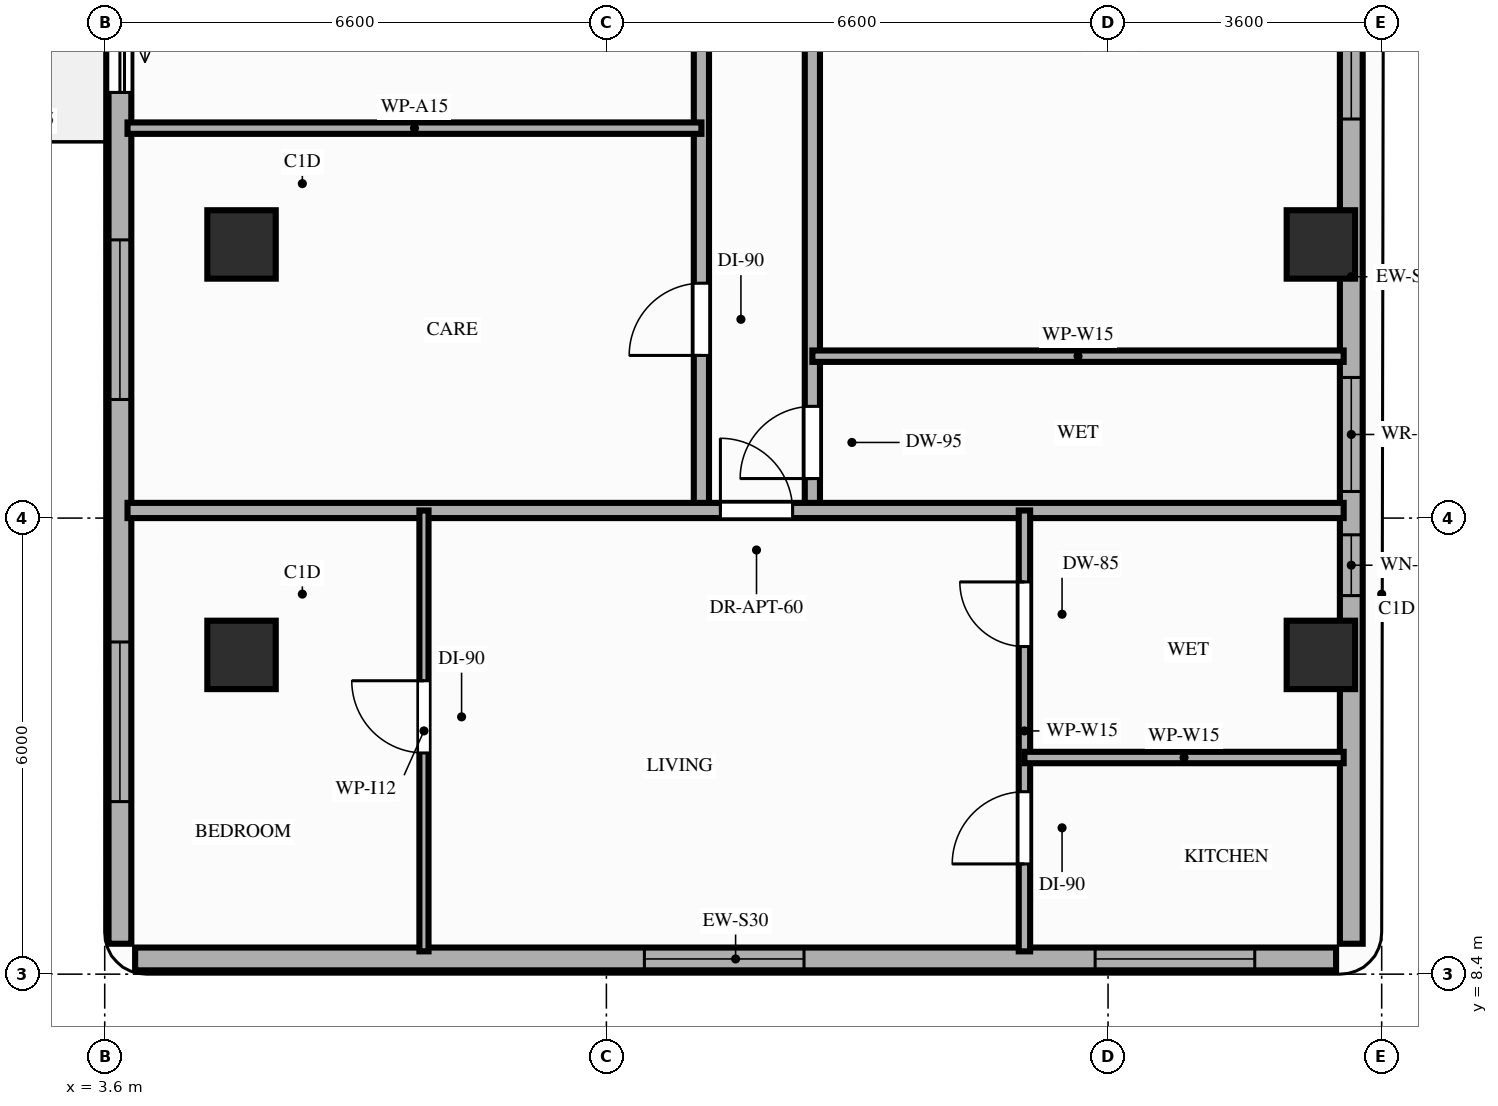
"""IFC4 building model, lengths in metres.
Left out: names, types, materials, properties, quantities, classifications, styles, units other than length and angle.
Written with IfcOpenShell. Run it as: python <this file> out.ifc"""

import sys

from ifc_helpers import new_model, si_unit, direction, frame, frame_2d, origin, origin_2d, place, context, subcontext, project, spatial, rectangle, extrude, element, fill, save


model = new_model("IFC4")
c1 = context("Model", 3, precision=1e-05, world=origin(), true_north=direction((0.0, 1.0)))
c2 = subcontext(c1, "Body", "Model", "MODEL_VIEW")
j1 = project(units=[si_unit("LENGTHUNIT", "METRE"), si_unit("PLANEANGLEUNIT", "RADIAN")], contexts=[c1])
p1 = place(None, origin())
s1 = spatial("IfcSite", under=j1, at=p1, CompositionType="ELEMENT")
p2 = place(p1, origin())
s2 = spatial("IfcBuilding", under=s1, at=p2, CompositionType="ELEMENT")
p3 = place(p2, frame((0.0, 0.0, 172.8)))
s3 = spatial("IfcBuildingStorey", under=s2, at=p3, CompositionType="ELEMENT", Elevation=172.8)
for number, where, z_axis, x_axis in (
    (1, (5.4, 12.6, 0.0), (0.0, 0.0, 1.0), (1.0, 0.0, 0.0)),
    (2, (19.6, 12.6, 0.0), (0.0, 0.0, 1.0), (1.0, 0.0, 0.0)),
    (3, (5.4, 18.0, 0.0), (0.0, 0.0, 1.0), (1.0, 0.0, 0.0)),
    (4, (19.6, 18.0, 0.0), (0.0, 0.0, 1.0), (1.0, 0.0, 0.0)),
):
    element("IfcColumn", number, at=place(p3, frame(where, z_axis=z_axis, x_axis=x_axis)), inside=s3, PredefinedType="COLUMN", context=c2, shape_type="SweptSolid", body=[
        extrude(rectangle(XDim=0.9, YDim=0.9, at=origin_2d()), origin(), (0.0, 0.0, 1.0), 3.2),
    ])
p4 = place(p3, frame((4.0, 8.6, 0.0), z_axis=(0.0, 0.0, 1.0), x_axis=(1.0, 0.0, 0.0)))
e5 = element("IfcWall", 5, at=p4, inside=s3, PredefinedType="STANDARD", context=c2, shape_type="SweptSolid", body=[
    extrude(rectangle(XDim=15.8, YDim=0.3, at=frame_2d((7.9, 0.0))), origin(), (0.0, 0.0, 1.0), 3.02),
])
p5 = place(p4, frame((6.7, 0.0, 0.85)))
e6 = element("IfcOpeningElement", 6, at=p5, cuts=e5, PredefinedType="OPENING", context=c2, shape_type="SweptSolid", body=[
    extrude(rectangle(XDim=2.1, YDim=1.8, at=frame_2d((1.05, 0.9))), frame((0.0, 0.16, 0.0), z_axis=(0.0, -1.0, 0.0), x_axis=(1.0, 0.0, 0.0)), (0.0, 0.0, 1.0), 0.32),
])
p6 = place(p4, frame((12.63, 0.0, 0.85)))
e7 = element("IfcOpeningElement", 7, at=p6, cuts=e5, PredefinedType="OPENING", context=c2, shape_type="SweptSolid", body=[
    extrude(rectangle(XDim=2.1, YDim=1.8, at=frame_2d((1.05, 0.9))), frame((0.0, 0.16, 0.0), z_axis=(0.0, -1.0, 0.0), x_axis=(1.0, 0.0, 0.0)), (0.0, 0.0, 1.0), 0.32),
])
p7 = place(p3, frame((3.8, 42.1, 0.0), z_axis=(0.0, 0.0, 1.0), x_axis=(0.0, -1.0, 0.0)))
e8 = element("IfcWall", 8, at=p7, inside=s3, PredefinedType="STANDARD", context=c2, shape_type="SweptSolid", body=[
    extrude(rectangle(XDim=33.3, YDim=0.3, at=frame_2d((16.65, 0.0))), origin(), (0.0, 0.0, 1.0), 2.71),
])
p8 = place(p7, frame((20.7, 0.0, 0.0)))
e9 = element("IfcOpeningElement", 9, at=p8, cuts=e8, PredefinedType="OPENING", context=c2, shape_type="SweptSolid", body=[
    extrude(rectangle(XDim=1.4, YDim=2.1, at=frame_2d((0.7, 1.05))), frame((0.0, 0.16, 0.0), z_axis=(0.0, -1.0, 0.0), x_axis=(1.0, 0.0, 0.0)), (0.0, 0.0, 1.0), 0.32),
])
p9 = place(p7, frame((29.33, 0.0, 0.85)))
e10 = element("IfcOpeningElement", 10, at=p9, cuts=e8, PredefinedType="OPENING", context=c2, shape_type="SweptSolid", body=[
    extrude(rectangle(XDim=2.1, YDim=1.61, at=frame_2d((1.05, 0.805))), frame((0.0, 0.16, 0.0), z_axis=(0.0, -1.0, 0.0), x_axis=(1.0, 0.0, 0.0)), (0.0, 0.0, 1.0), 0.32),
])
p10 = place(p7, frame((24.04, 0.0, 0.85)))
e11 = element("IfcOpeningElement", 11, at=p10, cuts=e8, PredefinedType="OPENING", context=c2, shape_type="SweptSolid", body=[
    extrude(rectangle(XDim=2.1, YDim=1.61, at=frame_2d((1.05, 0.805))), frame((0.0, 0.16, 0.0), z_axis=(0.0, -1.0, 0.0), x_axis=(1.0, 0.0, 0.0)), (0.0, 0.0, 1.0), 0.32),
])
p11 = place(p7, frame((14.95, 0.0, 0.85)))
e12 = element("IfcOpeningElement", 12, at=p11, cuts=e8, PredefinedType="OPENING", context=c2, shape_type="SweptSolid", body=[
    extrude(rectangle(XDim=2.1, YDim=1.61, at=frame_2d((1.05, 0.805))), frame((0.0, 0.16, 0.0), z_axis=(0.0, -1.0, 0.0), x_axis=(1.0, 0.0, 0.0)), (0.0, 0.0, 1.0), 0.32),
])
p12 = place(p7, frame((9.75, 0.0, 0.85)))
e13 = element("IfcOpeningElement", 13, at=p12, cuts=e8, PredefinedType="OPENING", context=c2, shape_type="SweptSolid", body=[
    extrude(rectangle(XDim=2.1, YDim=1.61, at=frame_2d((1.05, 0.805))), frame((0.0, 0.16, 0.0), z_axis=(0.0, -1.0, 0.0), x_axis=(1.0, 0.0, 0.0)), (0.0, 0.0, 1.0), 0.32),
])
p13 = place(p7, frame((3.65, 0.0, 0.85)))
e14 = element("IfcOpeningElement", 14, at=p13, cuts=e8, PredefinedType="OPENING", context=c2, shape_type="SweptSolid", body=[
    extrude(rectangle(XDim=2.1, YDim=1.61, at=frame_2d((1.05, 0.805))), frame((0.0, 0.16, 0.0), z_axis=(0.0, -1.0, 0.0), x_axis=(1.0, 0.0, 0.0)), (0.0, 0.0, 1.0), 0.32),
])
p14 = place(p3, frame((20.0, 8.8, 0.0), z_axis=(0.0, 0.0, 1.0), x_axis=(0.0, 1.0, 0.0)))
e15 = element("IfcWall", 15, at=p14, inside=s3, PredefinedType="STANDARD", context=c2, shape_type="SweptSolid", body=[
    extrude(rectangle(XDim=17.55, YDim=0.3, at=frame_2d((8.775, 0.0))), origin(), (0.0, 0.0, 1.0), 2.45),
])
p15 = place(p14, frame((4.58, 0.0, 0.85)))
e16 = element("IfcOpeningElement", 16, at=p15, cuts=e15, PredefinedType="OPENING", context=c2, shape_type="SweptSolid", body=[
    extrude(rectangle(XDim=0.8, YDim=1.35, at=frame_2d((0.4, 0.675))), frame((0.0, 0.16, 0.0), z_axis=(0.0, -1.0, 0.0), x_axis=(1.0, 0.0, 0.0)), (0.0, 0.0, 1.0), 0.32),
])
p16 = place(p14, frame((5.95, 0.0, 0.85)))
e17 = element("IfcOpeningElement", 17, at=p16, cuts=e15, PredefinedType="OPENING", context=c2, shape_type="SweptSolid", body=[
    extrude(rectangle(XDim=1.5, YDim=1.35, at=frame_2d((0.75, 0.675))), frame((0.0, 0.16, 0.0), z_axis=(0.0, -1.0, 0.0), x_axis=(1.0, 0.0, 0.0)), (0.0, 0.0, 1.0), 0.32),
])
p17 = place(p14, frame((10.85, 0.0, 0.85)))
e18 = element("IfcOpeningElement", 18, at=p17, cuts=e15, PredefinedType="OPENING", context=c2, shape_type="SweptSolid", body=[
    extrude(rectangle(XDim=2.1, YDim=1.35, at=frame_2d((1.05, 0.675))), frame((0.0, 0.16, 0.0), z_axis=(0.0, -1.0, 0.0), x_axis=(1.0, 0.0, 0.0)), (0.0, 0.0, 1.0), 0.32),
])
p18 = place(p3, frame((11.45, 14.5, 0.0), z_axis=(0.0, 0.0, 1.0), x_axis=(0.0, 1.0, 0.0)))
e19 = element("IfcWall", 19, at=p18, inside=s3, PredefinedType="PARTITIONING", context=c2, shape_type="SweptSolid", body=[
    extrude(rectangle(XDim=13.6, YDim=0.2, at=frame_2d((6.8, 0.0))), origin(), (0.0, 0.0, 1.0), 2.45),
])
p19 = place(p18, frame((2.04, 0.0, 0.0)))
e20 = element("IfcOpeningElement", 20, at=p19, cuts=e19, PredefinedType="OPENING", context=c2, shape_type="SweptSolid", body=[
    extrude(rectangle(XDim=0.95, YDim=2.15, at=frame_2d((0.475, 1.075))), frame((0.0, 0.11, 0.0), z_axis=(0.0, -1.0, 0.0), x_axis=(1.0, 0.0, 0.0)), (0.0, 0.0, 1.0), 0.22),
])
p20 = place(p18, frame((8.84, 0.0, 0.0)))
e21 = element("IfcOpeningElement", 21, at=p20, cuts=e19, PredefinedType="OPENING", context=c2, shape_type="SweptSolid", body=[
    extrude(rectangle(XDim=0.95, YDim=2.15, at=frame_2d((0.475, 1.075))), frame((0.0, 0.11, 0.0), z_axis=(0.0, -1.0, 0.0), x_axis=(1.0, 0.0, 0.0)), (0.0, 0.0, 1.0), 0.22),
])
p21 = place(p3, frame((12.91, 14.5, 0.0), z_axis=(0.0, 0.0, 1.0), x_axis=(0.0, 1.0, 0.0)))
e22 = element("IfcWall", 22, at=p21, inside=s3, PredefinedType="PARTITIONING", context=c2, shape_type="SweptSolid", body=[
    extrude(rectangle(XDim=13.6, YDim=0.2, at=frame_2d((6.8, 0.0))), origin(), (0.0, 0.0, 1.0), 2.45),
])
p22 = place(p21, frame((0.42, 0.0, 0.0)))
e23 = element("IfcOpeningElement", 23, at=p22, cuts=e22, PredefinedType="OPENING", context=c2, shape_type="SweptSolid", body=[
    extrude(rectangle(XDim=0.95, YDim=2.1, at=frame_2d((0.475, 1.05))), frame((0.0, 0.11, 0.0), z_axis=(0.0, -1.0, 0.0), x_axis=(1.0, 0.0, 0.0)), (0.0, 0.0, 1.0), 0.22),
])
p23 = place(p21, frame((7.34, 0.0, 0.0)))
e24 = element("IfcOpeningElement", 24, at=p23, cuts=e22, PredefinedType="OPENING", context=c2, shape_type="SweptSolid", body=[
    extrude(rectangle(XDim=0.95, YDim=2.15, at=frame_2d((0.475, 1.075))), frame((0.0, 0.11, 0.0), z_axis=(0.0, -1.0, 0.0), x_axis=(1.0, 0.0, 0.0)), (0.0, 0.0, 1.0), 0.22),
])
p24 = place(p3, frame((3.9, 14.5, 0.0), z_axis=(0.0, 0.0, 1.0), x_axis=(1.0, 0.0, 0.0)))
e25 = element("IfcWall", 25, at=p24, inside=s3, PredefinedType="PARTITIONING", context=c2, shape_type="SweptSolid", body=[
    extrude(rectangle(XDim=16.0, YDim=0.2, at=frame_2d((8.0, 0.0))), origin(), (0.0, 0.0, 1.0), 2.45),
])
p25 = place(p24, frame((7.8, 0.0, 0.0)))
e26 = element("IfcOpeningElement", 26, at=p25, cuts=e25, PredefinedType="OPENING", context=c2, shape_type="SweptSolid", body=[
    extrude(rectangle(XDim=0.95, YDim=2.15, at=frame_2d((0.475, 1.075))), frame((0.0, 0.11, 0.0), z_axis=(0.0, -1.0, 0.0), x_axis=(1.0, 0.0, 0.0)), (0.0, 0.0, 1.0), 0.22),
])
p26 = place(p3, frame((7.8, 8.7, 0.0), z_axis=(0.0, 0.0, 1.0), x_axis=(0.0, 1.0, 0.0)))
e27 = element("IfcWall", 27, at=p26, inside=s3, PredefinedType="PARTITIONING", context=c2, shape_type="SweptSolid", body=[
    extrude(rectangle(XDim=5.8, YDim=0.12, at=frame_2d((2.9, 0.0))), origin(), (0.0, 0.0, 1.0), 2.45),
])
p27 = place(p26, frame((2.61, 0.0, 0.0)))
e28 = element("IfcOpeningElement", 28, at=p27, cuts=e27, PredefinedType="OPENING", context=c2, shape_type="SweptSolid", body=[
    extrude(rectangle(XDim=0.95, YDim=2.15, at=frame_2d((0.475, 1.075))), frame((0.0, 0.07, 0.0), z_axis=(0.0, -1.0, 0.0), x_axis=(1.0, 0.0, 0.0)), (0.0, 0.0, 1.0), 0.14),
])
p28 = place(p3, frame((15.7, 8.7, 0.0), z_axis=(0.0, 0.0, 1.0), x_axis=(0.0, 1.0, 0.0)))
e29 = element("IfcWall", 29, at=p28, inside=s3, PredefinedType="PARTITIONING", context=c2, shape_type="SweptSolid", body=[
    extrude(rectangle(XDim=5.8, YDim=0.15, at=frame_2d((2.9, 0.0))), origin(), (0.0, 0.0, 1.0), 2.45),
])
p29 = place(p28, frame((1.15, 0.0, 0.0)))
e30 = element("IfcOpeningElement", 30, at=p29, cuts=e29, PredefinedType="OPENING", context=c2, shape_type="SweptSolid", body=[
    extrude(rectangle(XDim=0.95, YDim=2.15, at=frame_2d((0.475, 1.075))), frame((0.0, 0.085, 0.0), z_axis=(0.0, -1.0, 0.0), x_axis=(1.0, 0.0, 0.0)), (0.0, 0.0, 1.0), 0.17),
])
p30 = place(p28, frame((4.01, 0.0, 0.0)))
e31 = element("IfcOpeningElement", 31, at=p30, cuts=e29, PredefinedType="OPENING", context=c2, shape_type="SweptSolid", body=[
    extrude(rectangle(XDim=0.85, YDim=2.1, at=frame_2d((0.425, 1.05))), frame((0.0, 0.085, 0.0), z_axis=(0.0, -1.0, 0.0), x_axis=(1.0, 0.0, 0.0)), (0.0, 0.0, 1.0), 0.17),
])
p31 = place(p3, frame((15.7, 11.25, 0.0), z_axis=(0.0, 0.0, 1.0), x_axis=(1.0, 0.0, 0.0)))
e32 = element("IfcWall", 32, at=p31, inside=s3, PredefinedType="PARTITIONING", context=c2, shape_type="SweptSolid", body=[
    extrude(rectangle(XDim=4.2, YDim=0.15, at=frame_2d((2.1, 0.0))), origin(), (0.0, 0.0, 1.0), 3.02),
])
p32 = place(p3, frame((3.9, 19.53, 0.0), z_axis=(0.0, 0.0, 1.0), x_axis=(1.0, 0.0, 0.0)))
e33 = element("IfcWall", 33, at=p32, inside=s3, PredefinedType="PARTITIONING", context=c2, shape_type="SweptSolid", body=[
    extrude(rectangle(XDim=7.55, YDim=0.15, at=frame_2d((3.775, 0.0))), origin(), (0.0, 0.0, 1.0), 2.45),
])
p33 = place(p3, frame((12.91, 16.53, 0.0), z_axis=(0.0, 0.0, 1.0), x_axis=(1.0, 0.0, 0.0)))
e34 = element("IfcWall", 34, at=p33, inside=s3, PredefinedType="PARTITIONING", context=c2, shape_type="SweptSolid", body=[
    extrude(rectangle(XDim=6.99, YDim=0.15, at=frame_2d((3.495, 0.0))), origin(), (0.0, 0.0, 1.0), 2.45),
])
p34 = place(p8, origin())
e35 = element("IfcDoor", 35, at=p34, inside=s3, OperationType="SLIDING_TO_RIGHT", PredefinedType="DOOR", context=c2, shape_type="SweptSolid", body=[
    extrude(rectangle(XDim=1.4, YDim=2.1, at=frame_2d((0.7, 1.05))), frame((0.0, 0.025, 0.0), z_axis=(0.0, -1.0, 0.0), x_axis=(1.0, 0.0, 0.0)), (0.0, 0.0, 1.0), 0.05),
])
fill(e9, e35)
p35 = place(p9, origin())
e36 = element("IfcWindow", 36, at=p35, inside=s3, PartitioningType="SINGLE_PANEL", PredefinedType="WINDOW", context=c2, shape_type="SweptSolid", body=[
    extrude(rectangle(XDim=2.1, YDim=1.61, at=frame_2d((1.05, 0.805))), frame((0.0, 0.03, 0.0), z_axis=(0.0, -1.0, 0.0), x_axis=(1.0, 0.0, 0.0)), (0.0, 0.0, 1.0), 0.06),
])
fill(e10, e36)
p36 = place(p5, origin())
e37 = element("IfcWindow", 37, at=p36, inside=s3, PartitioningType="SINGLE_PANEL", PredefinedType="WINDOW", context=c2, shape_type="SweptSolid", body=[
    extrude(rectangle(XDim=2.1, YDim=1.8, at=frame_2d((1.05, 0.9))), frame((0.0, 0.03, 0.0), z_axis=(0.0, -1.0, 0.0), x_axis=(1.0, 0.0, 0.0)), (0.0, 0.0, 1.0), 0.06),
])
fill(e6, e37)
p37 = place(p6, origin())
e38 = element("IfcWindow", 38, at=p37, inside=s3, PartitioningType="SINGLE_PANEL", PredefinedType="WINDOW", context=c2, shape_type="SweptSolid", body=[
    extrude(rectangle(XDim=2.1, YDim=1.8, at=frame_2d((1.05, 0.9))), frame((0.0, 0.03, 0.0), z_axis=(0.0, -1.0, 0.0), x_axis=(1.0, 0.0, 0.0)), (0.0, 0.0, 1.0), 0.06),
])
fill(e7, e38)
p38 = place(p15, origin())
e39 = element("IfcWindow", 39, at=p38, inside=s3, PartitioningType="SINGLE_PANEL", PredefinedType="WINDOW", context=c2, shape_type="SweptSolid", body=[
    extrude(rectangle(XDim=0.8, YDim=1.35, at=frame_2d((0.4, 0.675))), frame((0.0, 0.03, 0.0), z_axis=(0.0, -1.0, 0.0), x_axis=(1.0, 0.0, 0.0)), (0.0, 0.0, 1.0), 0.06),
])
fill(e16, e39)
p39 = place(p10, origin())
e40 = element("IfcWindow", 40, at=p39, inside=s3, PartitioningType="SINGLE_PANEL", PredefinedType="WINDOW", context=c2, shape_type="SweptSolid", body=[
    extrude(rectangle(XDim=2.1, YDim=1.61, at=frame_2d((1.05, 0.805))), frame((0.0, 0.03, 0.0), z_axis=(0.0, -1.0, 0.0), x_axis=(1.0, 0.0, 0.0)), (0.0, 0.0, 1.0), 0.06),
])
fill(e11, e40)
p40 = place(p16, origin())
e41 = element("IfcWindow", 41, at=p40, inside=s3, PartitioningType="SINGLE_PANEL", PredefinedType="WINDOW", context=c2, shape_type="SweptSolid", body=[
    extrude(rectangle(XDim=1.5, YDim=1.35, at=frame_2d((0.75, 0.675))), frame((0.0, 0.03, 0.0), z_axis=(0.0, -1.0, 0.0), x_axis=(1.0, 0.0, 0.0)), (0.0, 0.0, 1.0), 0.06),
])
fill(e17, e41)
p41 = place(p17, origin())
e42 = element("IfcWindow", 42, at=p41, inside=s3, PartitioningType="SINGLE_PANEL", PredefinedType="WINDOW", context=c2, shape_type="SweptSolid", body=[
    extrude(rectangle(XDim=2.1, YDim=1.35, at=frame_2d((1.05, 0.675))), frame((0.0, 0.03, 0.0), z_axis=(0.0, -1.0, 0.0), x_axis=(1.0, 0.0, 0.0)), (0.0, 0.0, 1.0), 0.06),
])
fill(e18, e42)
p42 = place(p25, origin())
e43 = element("IfcDoor", 43, at=p42, inside=s3, OperationType="SINGLE_SWING_LEFT", PredefinedType="DOOR", context=c2, shape_type="SweptSolid", body=[
    extrude(rectangle(XDim=0.95, YDim=2.15, at=frame_2d((0.475, 1.075))), frame((0.0, 0.025, 0.0), z_axis=(0.0, -1.0, 0.0), x_axis=(1.0, 0.0, 0.0)), (0.0, 0.0, 1.0), 0.05),
])
fill(e26, e43)
p43 = place(p27, origin())
e44 = element("IfcDoor", 44, at=p43, inside=s3, OperationType="SINGLE_SWING_RIGHT", PredefinedType="DOOR", context=c2, shape_type="SweptSolid", body=[
    extrude(rectangle(XDim=0.95, YDim=2.15, at=frame_2d((0.475, 1.075))), frame((0.0, 0.025, 0.0), z_axis=(0.0, -1.0, 0.0), x_axis=(1.0, 0.0, 0.0)), (0.0, 0.0, 1.0), 0.05),
])
fill(e28, e44)
p44 = place(p29, origin())
e45 = element("IfcDoor", 45, at=p44, inside=s3, OperationType="SINGLE_SWING_LEFT", PredefinedType="DOOR", context=c2, shape_type="SweptSolid", body=[
    extrude(rectangle(XDim=0.95, YDim=2.15, at=frame_2d((0.475, 1.075))), frame((0.0, 0.025, 0.0), z_axis=(0.0, -1.0, 0.0), x_axis=(1.0, 0.0, 0.0)), (0.0, 0.0, 1.0), 0.05),
])
fill(e30, e45)
p45 = place(p30, origin())
e46 = element("IfcDoor", 46, at=p45, inside=s3, OperationType="SINGLE_SWING_RIGHT", PredefinedType="DOOR", context=c2, shape_type="SweptSolid", body=[
    extrude(rectangle(XDim=0.85, YDim=2.1, at=frame_2d((0.425, 1.05))), frame((0.0, 0.025, 0.0), z_axis=(0.0, -1.0, 0.0), x_axis=(1.0, 0.0, 0.0)), (0.0, 0.0, 1.0), 0.05),
])
fill(e31, e46)
p46 = place(p19, origin())
e47 = element("IfcDoor", 47, at=p46, inside=s3, OperationType="SINGLE_SWING_LEFT", PredefinedType="DOOR", context=c2, shape_type="SweptSolid", body=[
    extrude(rectangle(XDim=0.95, YDim=2.15, at=frame_2d((0.475, 1.075))), frame((0.0, 0.025, 0.0), z_axis=(0.0, -1.0, 0.0), x_axis=(1.0, 0.0, 0.0)), (0.0, 0.0, 1.0), 0.05),
])
fill(e20, e47)
p47 = place(p22, origin())
e48 = element("IfcDoor", 48, at=p47, inside=s3, OperationType="SINGLE_SWING_LEFT", PredefinedType="DOOR", context=c2, shape_type="SweptSolid", body=[
    extrude(rectangle(XDim=0.95, YDim=2.1, at=frame_2d((0.475, 1.05))), frame((0.0, 0.025, 0.0), z_axis=(0.0, -1.0, 0.0), x_axis=(1.0, 0.0, 0.0)), (0.0, 0.0, 1.0), 0.05),
])
fill(e23, e48)
save(model, sys.argv[1])
